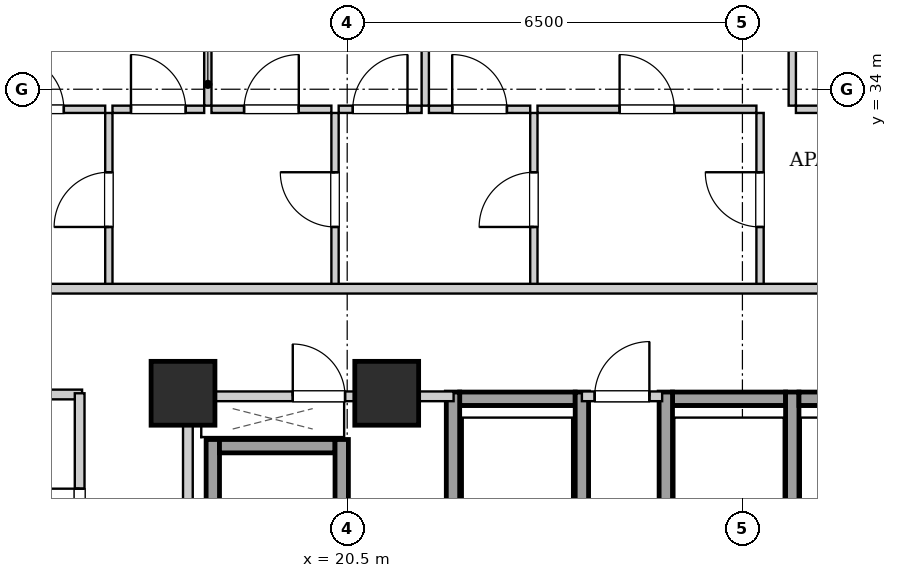
"""IFC4 building model, lengths in metres.
Left out: names, types, materials, properties, quantities, classifications, styles, units other than length and angle.
Written with IfcOpenShell. Run it as: python <this file> out.ifc"""

import sys

from ifc_helpers import new_model, si_unit, direction, frame, frame_2d, origin, origin_2d, place, context, subcontext, project, spatial, rectangle, extrude, element, fill, save


model = new_model("IFC4")
c1 = context("Model", 3, precision=1e-05, world=origin(), true_north=direction((0.0, 1.0)))
c2 = subcontext(c1, "Body", "Model", "MODEL_VIEW")
j1 = project(units=[si_unit("LENGTHUNIT", "METRE"), si_unit("PLANEANGLEUNIT", "RADIAN")], contexts=[c1])
p1 = place(None, origin())
s1 = spatial("IfcSite", under=j1, at=p1, CompositionType="ELEMENT")
p2 = place(p1, origin())
s2 = spatial("IfcBuilding", under=s1, at=p2, CompositionType="ELEMENT")
p3 = place(p2, frame((0.0, 0.0, 116.7)))
s3 = spatial("IfcBuildingStorey", under=s2, at=p3, CompositionType="ELEMENT", Elevation=116.7)
for number, where, z_axis, x_axis in (
    (1, (17.8, 29.0, 0.0), (0.0, 0.0, 1.0), (1.0, 0.0, 0.0)),
    (2, (21.15, 29.0, 0.0), (0.0, 0.0, 1.0), (1.0, 0.0, 0.0)),
):
    element("IfcColumn", number, at=place(p3, frame(where, z_axis=z_axis, x_axis=x_axis)), inside=s3, PredefinedType="COLUMN", context=c2, shape_type="SweptSolid", body=[
        extrude(rectangle(XDim=1.05, YDim=1.05, at=origin_2d()), origin(), (0.0, 0.0, 1.0), 3.2),
    ])
p4 = place(p3, frame((22.35, 28.91, 0.0), z_axis=(0.0, 0.0, 1.0), x_axis=(1.0, 0.0, 0.0)))
e3 = element("IfcWall", 3, at=p4, inside=s3, PredefinedType="SHEAR", context=c2, shape_type="SweptSolid", body=[
    extrude(rectangle(XDim=1.9, YDim=0.22, at=frame_2d((0.95, 0.0))), origin(), (0.0, 0.0, 1.0), 2.88),
])
for number, where, z_axis, x_axis in (
    (4, (22.24, 26.58, 0.0), (0.0, 0.0, 1.0), (0.0, 1.0, 0.0)),
    (5, (24.36, 26.58, 0.0), (0.0, 0.0, 1.0), (0.0, 1.0, 0.0)),
):
    element("IfcWall", number, at=place(p3, frame(where, z_axis=z_axis, x_axis=x_axis)), inside=s3, PredefinedType="SHEAR", context=c2, shape_type="SweptSolid", body=[
        extrude(rectangle(XDim=2.44, YDim=0.22, at=frame_2d((1.22, 0.0))), origin(), (0.0, 0.0, 1.0), 2.88),
    ])
p5 = place(p3, frame((25.85, 28.91, 0.0), z_axis=(0.0, 0.0, 1.0), x_axis=(1.0, 0.0, 0.0)))
e6 = element("IfcWall", 6, at=p5, inside=s3, PredefinedType="SHEAR", context=c2, shape_type="SweptSolid", body=[
    extrude(rectangle(XDim=1.86, YDim=0.22, at=frame_2d((0.93, 0.0))), origin(), (0.0, 0.0, 1.0), 2.88),
])
for number, where, z_axis, x_axis in (
    (7, (25.74, 26.58, 0.0), (0.0, 0.0, 1.0), (0.0, 1.0, 0.0)),
    (8, (27.82, 26.58, 0.0), (0.0, 0.0, 1.0), (0.0, 1.0, 0.0)),
):
    element("IfcWall", number, at=place(p3, frame(where, z_axis=z_axis, x_axis=x_axis)), inside=s3, PredefinedType="SHEAR", context=c2, shape_type="SweptSolid", body=[
        extrude(rectangle(XDim=2.44, YDim=0.22, at=frame_2d((1.22, 0.0))), origin(), (0.0, 0.0, 1.0), 2.88),
    ])
p6 = place(p3, frame((27.93, 28.91, 0.0), z_axis=(0.0, 0.0, 1.0), x_axis=(1.0, 0.0, 0.0)))
e9 = element("IfcWall", 9, at=p6, inside=s3, PredefinedType="SHEAR", context=c2, shape_type="SweptSolid", body=[
    extrude(rectangle(XDim=1.86, YDim=0.22, at=frame_2d((0.93, 0.0))), origin(), (0.0, 0.0, 1.0), 2.88),
])
p7 = place(p3, frame((18.29, 24.1, 0.0), z_axis=(0.0, 0.0, 1.0), x_axis=(0.0, 1.0, 0.0)))
e10 = element("IfcWall", 10, at=p7, inside=s3, PredefinedType="SHEAR", context=c2, shape_type="SweptSolid", body=[
    extrude(rectangle(XDim=4.14, YDim=0.22, at=frame_2d((2.07, 0.0))), origin(), (0.0, 0.0, 1.0), 2.88),
])
p8 = place(p3, frame((18.4, 28.13, 0.0), z_axis=(0.0, 0.0, 1.0), x_axis=(1.0, 0.0, 0.0)))
e11 = element("IfcWall", 11, at=p8, inside=s3, PredefinedType="SHEAR", context=c2, shape_type="SweptSolid", body=[
    extrude(rectangle(XDim=1.9, YDim=0.22, at=frame_2d((0.95, 0.0))), origin(), (0.0, 0.0, 1.0), 2.88),
])
p9 = place(p3, frame((20.41, 26.06, 0.0), z_axis=(0.0, 0.0, 1.0), x_axis=(0.0, 1.0, 0.0)))
e12 = element("IfcWall", 12, at=p9, inside=s3, PredefinedType="SHEAR", context=c2, shape_type="SweptSolid", body=[
    extrude(rectangle(XDim=2.18, YDim=0.22, at=frame_2d((1.09, 0.0))), origin(), (0.0, 0.0, 1.0), 2.88),
])
p10 = place(p3, frame((17.88, 24.12, 0.0), z_axis=(0.0, 0.0, 1.0), x_axis=(0.0, 1.0, 0.0)))
e13 = element("IfcWall", 13, at=p10, inside=s3, PredefinedType="PARTITIONING", context=c2, shape_type="SweptSolid", body=[
    extrude(rectangle(XDim=4.76, YDim=0.16, at=frame_2d((2.38, 0.0))), origin(), (0.0, 0.0, 1.0), 2.215),
])
p11 = place(p3, frame((24.36, 28.95, 0.0), z_axis=(0.0, 0.0, 1.0), x_axis=(1.0, 0.0, 0.0)))
e14 = element("IfcWall", 14, at=p11, inside=s3, PredefinedType="PARTITIONING", context=c2, shape_type="SweptSolid", body=[
    extrude(rectangle(XDim=1.32, YDim=0.16, at=frame_2d((0.66, 0.0))), origin(), (0.0, 0.0, 1.0), 2.253),
])
p12 = place(p11, frame((0.21, 0.0, 0.0)))
e15 = element("IfcOpeningElement", 15, at=p12, cuts=e14, PredefinedType="OPENING", context=c2, shape_type="SweptSolid", body=[
    extrude(rectangle(XDim=0.9, YDim=2.05, at=frame_2d((0.45, 1.025))), frame((0.0, 0.09, 0.0), z_axis=(0.0, -1.0, 0.0), x_axis=(1.0, 0.0, 0.0)), (0.0, 0.0, 1.0), 0.18),
])
p13 = place(p3, frame((17.96, 28.95, 0.0), z_axis=(0.0, 0.0, 1.0), x_axis=(1.0, 0.0, 0.0)))
e16 = element("IfcWall", 16, at=p13, inside=s3, PredefinedType="PARTITIONING", context=c2, shape_type="SweptSolid", body=[
    extrude(rectangle(XDim=4.29, YDim=0.16, at=frame_2d((2.145, 0.0))), origin(), (0.0, 0.0, 1.0), 2.253),
])
p14 = place(p13, frame((1.645, 0.0, 0.0)))
e17 = element("IfcOpeningElement", 17, at=p14, cuts=e16, PredefinedType="OPENING", context=c2, shape_type="SweptSolid", body=[
    extrude(rectangle(XDim=0.86, YDim=2.05, at=frame_2d((0.43, 1.025))), frame((0.0, 0.09, 0.0), z_axis=(0.0, -1.0, 0.0), x_axis=(1.0, 0.0, 0.0)), (0.0, 0.0, 1.0), 0.18),
])
p15 = place(p3, frame((7.78, 28.98, 0.0), z_axis=(0.0, 0.0, 1.0), x_axis=(1.0, 0.0, 0.0)))
e18 = element("IfcWall", 18, at=p15, inside=s3, PredefinedType="PARTITIONING", context=c2, shape_type="SweptSolid", body=[
    extrude(rectangle(XDim=8.36, YDim=0.16, at=frame_2d((4.18, 0.0))), origin(), (0.0, 0.0, 1.0), 2.253),
])
p16 = place(p3, frame((16.58, 30.76, 0.0), z_axis=(0.0, 0.0, 1.0), x_axis=(0.0, 1.0, 0.0)))
e19 = element("IfcWall", 19, at=p16, inside=s3, PredefinedType="PARTITIONING", context=c2, shape_type="SweptSolid", body=[
    extrude(rectangle(XDim=2.85, YDim=0.12, at=frame_2d((1.425, 0.0))), origin(), (0.0, 0.0, 1.0), 2.88),
])
p17 = place(p16, frame((0.975, 0.0, 0.0)))
e20 = element("IfcOpeningElement", 20, at=p17, cuts=e19, PredefinedType="OPENING", context=c2, shape_type="SweptSolid", body=[
    extrude(rectangle(XDim=0.9, YDim=2.05, at=frame_2d((0.45, 1.025))), frame((0.0, 0.07, 0.0), z_axis=(0.0, -1.0, 0.0), x_axis=(1.0, 0.0, 0.0)), (0.0, 0.0, 1.0), 0.14),
])
p18 = place(p3, frame((14.26, 33.67, 0.0), z_axis=(0.0, 0.0, 1.0), x_axis=(1.0, 0.0, 0.0)))
e21 = element("IfcWall", 21, at=p18, inside=s3, PredefinedType="PARTITIONING", context=c2, shape_type="SweptSolid", body=[
    extrude(rectangle(XDim=2.26, YDim=0.12, at=frame_2d((1.13, 0.0))), origin(), (0.0, 0.0, 1.0), 2.88),
])
p19 = place(p18, frame((0.68, 0.0, 0.0)))
e22 = element("IfcOpeningElement", 22, at=p19, cuts=e21, PredefinedType="OPENING", context=c2, shape_type="SweptSolid", body=[
    extrude(rectangle(XDim=0.9, YDim=2.05, at=frame_2d((0.45, 1.025))), frame((0.0, 0.07, 0.0), z_axis=(0.0, -1.0, 0.0), x_axis=(1.0, 0.0, 0.0)), (0.0, 0.0, 1.0), 0.14),
])
p20 = place(p3, frame((20.3, 30.76, 0.0), z_axis=(0.0, 0.0, 1.0), x_axis=(0.0, 1.0, 0.0)))
e23 = element("IfcWall", 23, at=p20, inside=s3, PredefinedType="PARTITIONING", context=c2, shape_type="SweptSolid", body=[
    extrude(rectangle(XDim=2.85, YDim=0.12, at=frame_2d((1.425, 0.0))), origin(), (0.0, 0.0, 1.0), 2.88),
])
p21 = place(p20, frame((0.975, 0.0, 0.0)))
e24 = element("IfcOpeningElement", 24, at=p21, cuts=e23, PredefinedType="OPENING", context=c2, shape_type="SweptSolid", body=[
    extrude(rectangle(XDim=0.9, YDim=2.05, at=frame_2d((0.45, 1.025))), frame((0.0, 0.07, 0.0), z_axis=(0.0, -1.0, 0.0), x_axis=(1.0, 0.0, 0.0)), (0.0, 0.0, 1.0), 0.14),
])
p22 = place(p3, frame((16.64, 33.67, 0.0), z_axis=(0.0, 0.0, 1.0), x_axis=(1.0, 0.0, 0.0)))
e25 = element("IfcWall", 25, at=p22, inside=s3, PredefinedType="PARTITIONING", context=c2, shape_type="SweptSolid", body=[
    extrude(rectangle(XDim=1.508, YDim=0.12, at=frame_2d((0.754, 0.0))), origin(), (0.0, 0.0, 1.0), 2.88),
])
p23 = place(p22, frame((0.304, 0.0, 0.0)))
e26 = element("IfcOpeningElement", 26, at=p23, cuts=e25, PredefinedType="OPENING", context=c2, shape_type="SweptSolid", body=[
    extrude(rectangle(XDim=0.9, YDim=2.05, at=frame_2d((0.45, 1.025))), frame((0.0, 0.07, 0.0), z_axis=(0.0, -1.0, 0.0), x_axis=(1.0, 0.0, 0.0)), (0.0, 0.0, 1.0), 0.14),
])
p24 = place(p3, frame((18.268, 33.67, 0.0), z_axis=(0.0, 0.0, 1.0), x_axis=(1.0, 0.0, 0.0)))
e27 = element("IfcWall", 27, at=p24, inside=s3, PredefinedType="PARTITIONING", context=c2, shape_type="SweptSolid", body=[
    extrude(rectangle(XDim=1.972, YDim=0.12, at=frame_2d((0.986, 0.0))), origin(), (0.0, 0.0, 1.0), 2.88),
])
p25 = place(p24, frame((0.536, 0.0, 0.0)))
e28 = element("IfcOpeningElement", 28, at=p25, cuts=e27, PredefinedType="OPENING", context=c2, shape_type="SweptSolid", body=[
    extrude(rectangle(XDim=0.9, YDim=2.05, at=frame_2d((0.45, 1.025))), frame((0.0, 0.07, 0.0), z_axis=(0.0, -1.0, 0.0), x_axis=(1.0, 0.0, 0.0)), (0.0, 0.0, 1.0), 0.14),
])
p26 = place(p3, frame((23.57, 30.76, 0.0), z_axis=(0.0, 0.0, 1.0), x_axis=(0.0, 1.0, 0.0)))
e29 = element("IfcWall", 29, at=p26, inside=s3, PredefinedType="PARTITIONING", context=c2, shape_type="SweptSolid", body=[
    extrude(rectangle(XDim=2.85, YDim=0.12, at=frame_2d((1.425, 0.0))), origin(), (0.0, 0.0, 1.0), 2.88),
])
p27 = place(p26, frame((0.975, 0.0, 0.0)))
e30 = element("IfcOpeningElement", 30, at=p27, cuts=e29, PredefinedType="OPENING", context=c2, shape_type="SweptSolid", body=[
    extrude(rectangle(XDim=0.9, YDim=2.05, at=frame_2d((0.45, 1.025))), frame((0.0, 0.07, 0.0), z_axis=(0.0, -1.0, 0.0), x_axis=(1.0, 0.0, 0.0)), (0.0, 0.0, 1.0), 0.14),
])
p28 = place(p3, frame((20.36, 33.67, 0.0), z_axis=(0.0, 0.0, 1.0), x_axis=(1.0, 0.0, 0.0)))
e31 = element("IfcWall", 31, at=p28, inside=s3, PredefinedType="PARTITIONING", context=c2, shape_type="SweptSolid", body=[
    extrude(rectangle(XDim=1.364, YDim=0.12, at=frame_2d((0.682, 0.0))), origin(), (0.0, 0.0, 1.0), 2.88),
])
p29 = place(p28, frame((0.232, 0.0, 0.0)))
e32 = element("IfcOpeningElement", 32, at=p29, cuts=e31, PredefinedType="OPENING", context=c2, shape_type="SweptSolid", body=[
    extrude(rectangle(XDim=0.9, YDim=2.05, at=frame_2d((0.45, 1.025))), frame((0.0, 0.07, 0.0), z_axis=(0.0, -1.0, 0.0), x_axis=(1.0, 0.0, 0.0)), (0.0, 0.0, 1.0), 0.14),
])
p30 = place(p3, frame((21.844, 33.67, 0.0), z_axis=(0.0, 0.0, 1.0), x_axis=(1.0, 0.0, 0.0)))
e33 = element("IfcWall", 33, at=p30, inside=s3, PredefinedType="PARTITIONING", context=c2, shape_type="SweptSolid", body=[
    extrude(rectangle(XDim=1.666, YDim=0.12, at=frame_2d((0.833, 0.0))), origin(), (0.0, 0.0, 1.0), 2.88),
])
p31 = place(p30, frame((0.383, 0.0, 0.0)))
e34 = element("IfcOpeningElement", 34, at=p31, cuts=e33, PredefinedType="OPENING", context=c2, shape_type="SweptSolid", body=[
    extrude(rectangle(XDim=0.9, YDim=2.05, at=frame_2d((0.45, 1.025))), frame((0.0, 0.07, 0.0), z_axis=(0.0, -1.0, 0.0), x_axis=(1.0, 0.0, 0.0)), (0.0, 0.0, 1.0), 0.14),
])
p32 = place(p3, frame((27.29, 30.76, 0.0), z_axis=(0.0, 0.0, 1.0), x_axis=(0.0, 1.0, 0.0)))
e35 = element("IfcWall", 35, at=p32, inside=s3, PredefinedType="PARTITIONING", context=c2, shape_type="SweptSolid", body=[
    extrude(rectangle(XDim=2.85, YDim=0.12, at=frame_2d((1.425, 0.0))), origin(), (0.0, 0.0, 1.0), 2.88),
])
p33 = place(p32, frame((0.975, 0.0, 0.0)))
e36 = element("IfcOpeningElement", 36, at=p33, cuts=e35, PredefinedType="OPENING", context=c2, shape_type="SweptSolid", body=[
    extrude(rectangle(XDim=0.9, YDim=2.05, at=frame_2d((0.45, 1.025))), frame((0.0, 0.07, 0.0), z_axis=(0.0, -1.0, 0.0), x_axis=(1.0, 0.0, 0.0)), (0.0, 0.0, 1.0), 0.14),
])
p34 = place(p3, frame((23.63, 33.67, 0.0), z_axis=(0.0, 0.0, 1.0), x_axis=(1.0, 0.0, 0.0)))
e37 = element("IfcWall", 37, at=p34, inside=s3, PredefinedType="PARTITIONING", context=c2, shape_type="SweptSolid", body=[
    extrude(rectangle(XDim=3.6, YDim=0.12, at=frame_2d((1.8, 0.0))), origin(), (0.0, 0.0, 1.0), 2.88),
])
p35 = place(p34, frame((1.35, 0.0, 0.0)))
e38 = element("IfcOpeningElement", 38, at=p35, cuts=e37, PredefinedType="OPENING", context=c2, shape_type="SweptSolid", body=[
    extrude(rectangle(XDim=0.9, YDim=2.05, at=frame_2d((0.45, 1.025))), frame((0.0, 0.07, 0.0), z_axis=(0.0, -1.0, 0.0), x_axis=(1.0, 0.0, 0.0)), (0.0, 0.0, 1.0), 0.14),
])
p36 = place(p3, frame((27.88, 33.67, 0.0), z_axis=(0.0, 0.0, 1.0), x_axis=(1.0, 0.0, 0.0)))
e39 = element("IfcWall", 39, at=p36, inside=s3, PredefinedType="PARTITIONING", context=c2, shape_type="SweptSolid", body=[
    extrude(rectangle(XDim=3.24, YDim=0.12, at=frame_2d((1.62, 0.0))), origin(), (0.0, 0.0, 1.0), 2.88),
])
p37 = place(p36, frame((1.17, 0.0, 0.0)))
e40 = element("IfcOpeningElement", 40, at=p37, cuts=e39, PredefinedType="OPENING", context=c2, shape_type="SweptSolid", body=[
    extrude(rectangle(XDim=0.9, YDim=2.05, at=frame_2d((0.45, 1.025))), frame((0.0, 0.07, 0.0), z_axis=(0.0, -1.0, 0.0), x_axis=(1.0, 0.0, 0.0)), (0.0, 0.0, 1.0), 0.14),
])
p38 = place(p3, frame((18.208, 33.73, 0.0), z_axis=(0.0, 0.0, 1.0), x_axis=(0.0, 1.0, 0.0)))
e41 = element("IfcWall", 41, at=p38, inside=s3, PredefinedType="PARTITIONING", context=c2, shape_type="SweptSolid", body=[
    extrude(rectangle(XDim=9.29, YDim=0.12, at=frame_2d((4.645, 0.0))), origin(), (0.0, 0.0, 1.0), 2.88),
])
p39 = place(p38, frame((4.18, 0.0, 0.0)))
e42 = element("IfcOpeningElement", 42, at=p39, cuts=e41, PredefinedType="OPENING", context=c2, shape_type="SweptSolid", body=[
    extrude(rectangle(XDim=0.9, YDim=2.05, at=frame_2d((0.45, 1.025))), frame((0.0, 0.07, 0.0), z_axis=(0.0, -1.0, 0.0), x_axis=(1.0, 0.0, 0.0)), (0.0, 0.0, 1.0), 0.14),
])
p40 = place(p3, frame((21.784, 33.73, 0.0), z_axis=(0.0, 0.0, 1.0), x_axis=(0.0, 1.0, 0.0)))
e43 = element("IfcWall", 43, at=p40, inside=s3, PredefinedType="PARTITIONING", context=c2, shape_type="SweptSolid", body=[
    extrude(rectangle(XDim=9.29, YDim=0.12, at=frame_2d((4.645, 0.0))), origin(), (0.0, 0.0, 1.0), 2.88),
])
p41 = place(p40, frame((4.18, 0.0, 0.0)))
e44 = element("IfcOpeningElement", 44, at=p41, cuts=e43, PredefinedType="OPENING", context=c2, shape_type="SweptSolid", body=[
    extrude(rectangle(XDim=0.9, YDim=2.05, at=frame_2d((0.45, 1.025))), frame((0.0, 0.07, 0.0), z_axis=(0.0, -1.0, 0.0), x_axis=(1.0, 0.0, 0.0)), (0.0, 0.0, 1.0), 0.14),
])
p42 = place(p3, frame((27.82, 33.73, 0.0), z_axis=(0.0, 0.0, 1.0), x_axis=(0.0, 1.0, 0.0)))
e45 = element("IfcWall", 45, at=p42, inside=s3, PredefinedType="PARTITIONING", context=c2, shape_type="SweptSolid", body=[
    extrude(rectangle(XDim=9.29, YDim=0.12, at=frame_2d((4.645, 0.0))), origin(), (0.0, 0.0, 1.0), 2.88),
])
p43 = place(p42, frame((4.18, 0.0, 0.0)))
e46 = element("IfcOpeningElement", 46, at=p43, cuts=e45, PredefinedType="OPENING", context=c2, shape_type="SweptSolid", body=[
    extrude(rectangle(XDim=0.9, YDim=2.05, at=frame_2d((0.45, 1.025))), frame((0.0, 0.07, 0.0), z_axis=(0.0, -1.0, 0.0), x_axis=(1.0, 0.0, 0.0)), (0.0, 0.0, 1.0), 0.14),
])
p44 = place(p3, frame((10.05, 30.72, 0.0), z_axis=(0.0, 0.0, 1.0), x_axis=(1.0, 0.0, 0.0)))
e47 = element("IfcWall", 47, at=p44, inside=s3, PredefinedType="PARTITIONING", context=c2, shape_type="SweptSolid", body=[
    extrude(rectangle(XDim=30.8, YDim=0.16, at=frame_2d((15.4, 0.0))), origin(), (0.0, 0.0, 1.0), 2.88),
])
p45 = place(p44, frame((4.035, 0.0, 0.0)))
e48 = element("IfcOpeningElement", 48, at=p45, cuts=e47, PredefinedType="OPENING", context=c2, shape_type="SweptSolid", body=[
    extrude(rectangle(XDim=0.95, YDim=2.1, at=frame_2d((0.475, 1.05))), frame((0.0, 0.09, 0.0), z_axis=(0.0, -1.0, 0.0), x_axis=(1.0, 0.0, 0.0)), (0.0, 0.0, 1.0), 0.18),
])
p46 = place(p44, frame((25.11, 0.0, 0.0)))
e49 = element("IfcOpeningElement", 49, at=p46, cuts=e47, PredefinedType="OPENING", context=c2, shape_type="SweptSolid", body=[
    extrude(rectangle(XDim=0.95, YDim=2.1, at=frame_2d((0.475, 1.05))), frame((0.0, 0.09, 0.0), z_axis=(0.0, -1.0, 0.0), x_axis=(1.0, 0.0, 0.0)), (0.0, 0.0, 1.0), 0.18),
])
p47 = place(p3, frame((16.1, 15.07, 0.0), z_axis=(0.0, 0.0, 1.0), x_axis=(0.0, 1.0, 0.0)))
e50 = element("IfcWall", 50, at=p47, inside=s3, PredefinedType="PARTITIONING", context=c2, shape_type="SweptSolid", body=[
    extrude(rectangle(XDim=13.93, YDim=0.16, at=frame_2d((6.965, 0.0))), origin(), (0.0, 0.0, 1.0), 2.88),
])
p48 = place(p47, frame((4.661, 0.0, 0.0)))
e51 = element("IfcOpeningElement", 51, at=p48, cuts=e50, PredefinedType="OPENING", context=c2, shape_type="SweptSolid", body=[
    extrude(rectangle(XDim=0.95, YDim=2.1, at=frame_2d((0.475, 1.05))), frame((0.0, 0.09, 0.0), z_axis=(0.0, -1.0, 0.0), x_axis=(1.0, 0.0, 0.0)), (0.0, 0.0, 1.0), 0.18),
])
p49 = place(p47, frame((11.411, 0.0, 0.0)))
e52 = element("IfcOpeningElement", 52, at=p49, cuts=e50, PredefinedType="OPENING", context=c2, shape_type="SweptSolid", body=[
    extrude(rectangle(XDim=0.95, YDim=2.1, at=frame_2d((0.475, 1.05))), frame((0.0, 0.09, 0.0), z_axis=(0.0, -1.0, 0.0), x_axis=(1.0, 0.0, 0.0)), (0.0, 0.0, 1.0), 0.18),
])
p50 = place(p12, origin())
e53 = element("IfcDoor", 53, at=p50, inside=s3, OperationType="SINGLE_SWING_RIGHT", PredefinedType="DOOR", context=c2, shape_type="SweptSolid", body=[
    extrude(rectangle(XDim=0.9, YDim=2.05, at=frame_2d((0.45, 1.025))), frame((0.0, 0.025, 0.0), z_axis=(0.0, -1.0, 0.0), x_axis=(1.0, 0.0, 0.0)), (0.0, 0.0, 1.0), 0.05),
])
fill(e15, e53)
p51 = place(p14, origin())
e54 = element("IfcDoor", 54, at=p51, inside=s3, OperationType="SINGLE_SWING_LEFT", PredefinedType="DOOR", context=c2, shape_type="SweptSolid", body=[
    extrude(rectangle(XDim=0.86, YDim=2.05, at=frame_2d((0.43, 1.025))), frame((0.0, 0.025, 0.0), z_axis=(0.0, -1.0, 0.0), x_axis=(1.0, 0.0, 0.0)), (0.0, 0.0, 1.0), 0.05),
])
fill(e17, e54)
p52 = place(p17, origin())
e55 = element("IfcDoor", 55, at=p52, inside=s3, OperationType="SINGLE_SWING_LEFT", PredefinedType="DOOR", context=c2, shape_type="SweptSolid", body=[
    extrude(rectangle(XDim=0.9, YDim=2.05, at=frame_2d((0.45, 1.025))), frame((0.0, 0.025, 0.0), z_axis=(0.0, -1.0, 0.0), x_axis=(1.0, 0.0, 0.0)), (0.0, 0.0, 1.0), 0.05),
])
fill(e20, e55)
p53 = place(p19, origin())
e56 = element("IfcDoor", 56, at=p53, inside=s3, OperationType="SINGLE_SWING_LEFT", PredefinedType="DOOR", context=c2, shape_type="SweptSolid", body=[
    extrude(rectangle(XDim=0.9, YDim=2.05, at=frame_2d((0.45, 1.025))), frame((0.0, 0.025, 0.0), z_axis=(0.0, -1.0, 0.0), x_axis=(1.0, 0.0, 0.0)), (0.0, 0.0, 1.0), 0.05),
])
fill(e22, e56)
p54 = place(p21, origin())
e57 = element("IfcDoor", 57, at=p54, inside=s3, OperationType="SINGLE_SWING_RIGHT", PredefinedType="DOOR", context=c2, shape_type="SweptSolid", body=[
    extrude(rectangle(XDim=0.9, YDim=2.05, at=frame_2d((0.45, 1.025))), frame((0.0, 0.025, 0.0), z_axis=(0.0, -1.0, 0.0), x_axis=(1.0, 0.0, 0.0)), (0.0, 0.0, 1.0), 0.05),
])
fill(e24, e57)
p55 = place(p23, origin())
e58 = element("IfcDoor", 58, at=p55, inside=s3, OperationType="SINGLE_SWING_LEFT", PredefinedType="DOOR", context=c2, shape_type="SweptSolid", body=[
    extrude(rectangle(XDim=0.9, YDim=2.05, at=frame_2d((0.45, 1.025))), frame((0.0, 0.025, 0.0), z_axis=(0.0, -1.0, 0.0), x_axis=(1.0, 0.0, 0.0)), (0.0, 0.0, 1.0), 0.05),
])
fill(e26, e58)
p56 = place(p25, origin())
e59 = element("IfcDoor", 59, at=p56, inside=s3, OperationType="SINGLE_SWING_RIGHT", PredefinedType="DOOR", context=c2, shape_type="SweptSolid", body=[
    extrude(rectangle(XDim=0.9, YDim=2.05, at=frame_2d((0.45, 1.025))), frame((0.0, 0.025, 0.0), z_axis=(0.0, -1.0, 0.0), x_axis=(1.0, 0.0, 0.0)), (0.0, 0.0, 1.0), 0.05),
])
fill(e28, e59)
p57 = place(p27, origin())
e60 = element("IfcDoor", 60, at=p57, inside=s3, OperationType="SINGLE_SWING_LEFT", PredefinedType="DOOR", context=c2, shape_type="SweptSolid", body=[
    extrude(rectangle(XDim=0.9, YDim=2.05, at=frame_2d((0.45, 1.025))), frame((0.0, 0.025, 0.0), z_axis=(0.0, -1.0, 0.0), x_axis=(1.0, 0.0, 0.0)), (0.0, 0.0, 1.0), 0.05),
])
fill(e30, e60)
p58 = place(p29, origin())
e61 = element("IfcDoor", 61, at=p58, inside=s3, OperationType="SINGLE_SWING_RIGHT", PredefinedType="DOOR", context=c2, shape_type="SweptSolid", body=[
    extrude(rectangle(XDim=0.9, YDim=2.05, at=frame_2d((0.45, 1.025))), frame((0.0, 0.025, 0.0), z_axis=(0.0, -1.0, 0.0), x_axis=(1.0, 0.0, 0.0)), (0.0, 0.0, 1.0), 0.05),
])
fill(e32, e61)
p59 = place(p31, origin())
e62 = element("IfcDoor", 62, at=p59, inside=s3, OperationType="SINGLE_SWING_LEFT", PredefinedType="DOOR", context=c2, shape_type="SweptSolid", body=[
    extrude(rectangle(XDim=0.9, YDim=2.05, at=frame_2d((0.45, 1.025))), frame((0.0, 0.025, 0.0), z_axis=(0.0, -1.0, 0.0), x_axis=(1.0, 0.0, 0.0)), (0.0, 0.0, 1.0), 0.05),
])
fill(e34, e62)
p60 = place(p33, origin())
e63 = element("IfcDoor", 63, at=p60, inside=s3, OperationType="SINGLE_SWING_RIGHT", PredefinedType="DOOR", context=c2, shape_type="SweptSolid", body=[
    extrude(rectangle(XDim=0.9, YDim=2.05, at=frame_2d((0.45, 1.025))), frame((0.0, 0.025, 0.0), z_axis=(0.0, -1.0, 0.0), x_axis=(1.0, 0.0, 0.0)), (0.0, 0.0, 1.0), 0.05),
])
fill(e36, e63)
p61 = place(p35, origin())
e64 = element("IfcDoor", 64, at=p61, inside=s3, OperationType="SINGLE_SWING_LEFT", PredefinedType="DOOR", context=c2, shape_type="SweptSolid", body=[
    extrude(rectangle(XDim=0.9, YDim=2.05, at=frame_2d((0.45, 1.025))), frame((0.0, 0.025, 0.0), z_axis=(0.0, -1.0, 0.0), x_axis=(1.0, 0.0, 0.0)), (0.0, 0.0, 1.0), 0.05),
])
fill(e38, e64)
p62 = place(p49, origin())
e65 = element("IfcDoor", 65, at=p62, inside=s3, OperationType="SINGLE_SWING_RIGHT", PredefinedType="DOOR", context=c2, shape_type="SweptSolid", body=[
    extrude(rectangle(XDim=0.95, YDim=2.1, at=frame_2d((0.475, 1.05))), frame((0.0, 0.025, 0.0), z_axis=(0.0, -1.0, 0.0), x_axis=(1.0, 0.0, 0.0)), (0.0, 0.0, 1.0), 0.05),
])
fill(e52, e65)
save(model, sys.argv[1])
